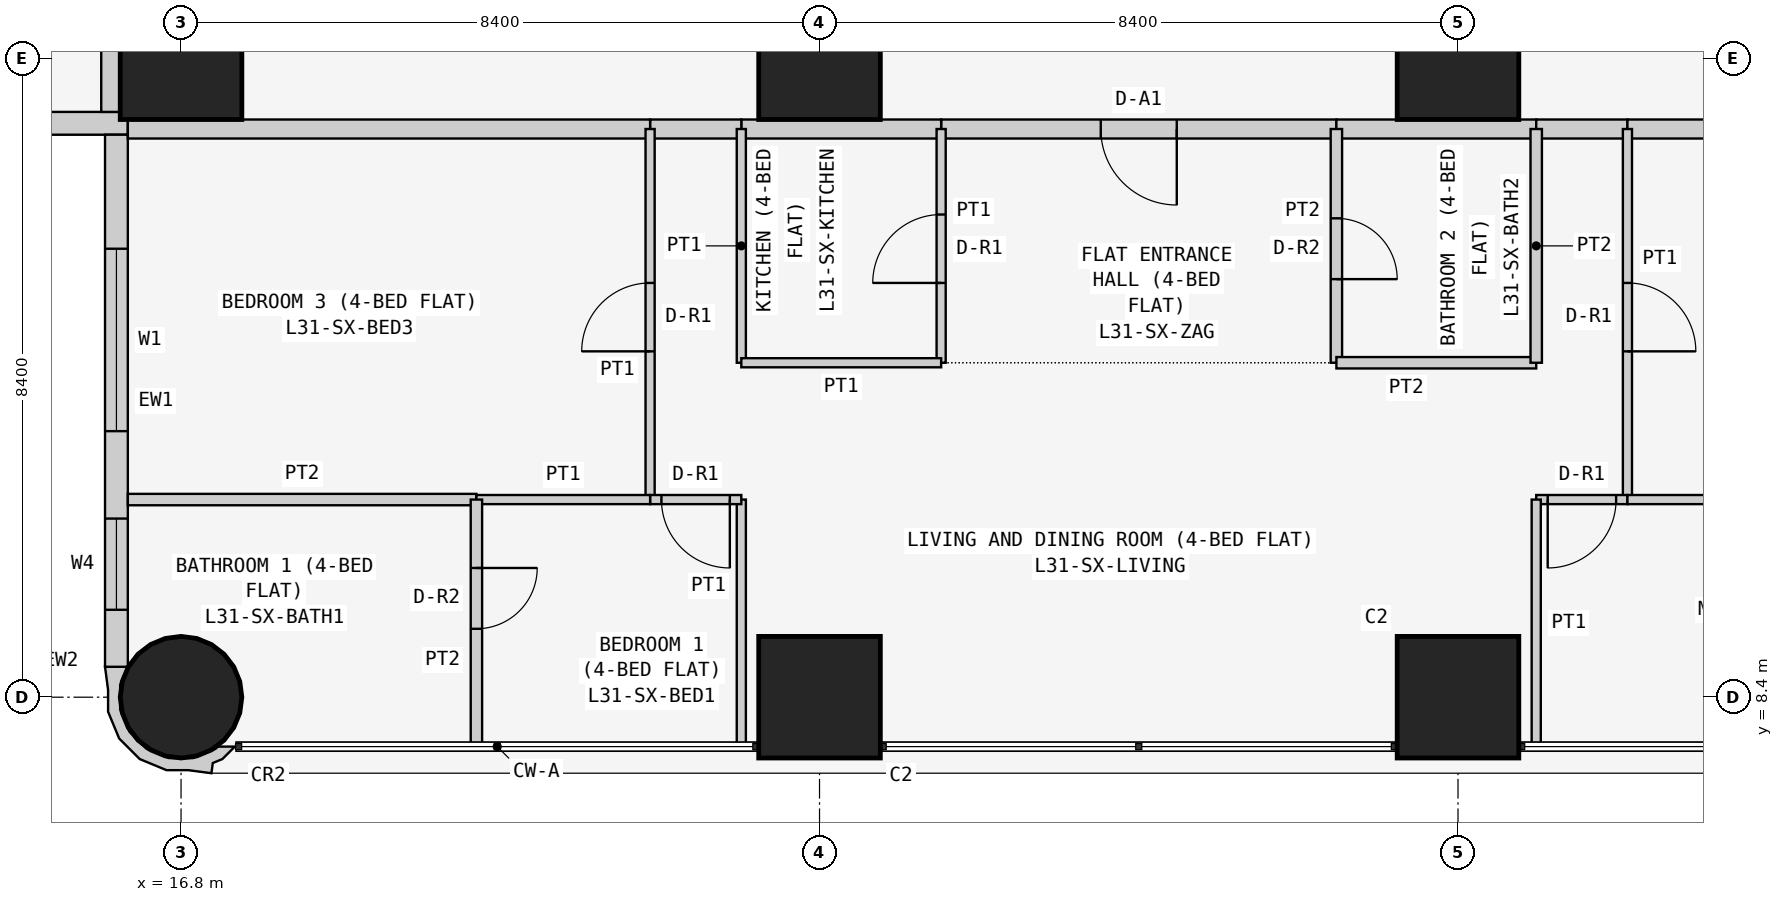
"""IFC4 building model, lengths in metres.
Left out: names, types, materials, properties, quantities, classifications, styles, units other than length and angle.
Written with IfcOpenShell. Run it as: python <this file> out.ifc"""

import sys

from ifc_helpers import new_model, si_unit, direction, frame, frame_2d, origin, origin_2d, place, context, subcontext, project, spatial, polyline, rectangle, circle, outline, extrude, element, fill, save


model = new_model("IFC4")
c1 = context("Model", 3, precision=1e-05, world=origin(), true_north=direction((0.0, 1.0)))
c2 = subcontext(c1, "Body", "Model", "MODEL_VIEW")
j1 = project(units=[si_unit("LENGTHUNIT", "METRE"), si_unit("PLANEANGLEUNIT", "RADIAN")], contexts=[c1])
p1 = place(None, origin())
s1 = spatial("IfcSite", under=j1, at=p1, CompositionType="ELEMENT")
p2 = place(p1, origin())
s2 = spatial("IfcBuilding", under=s1, at=p2, CompositionType="ELEMENT")
p3 = place(p2, frame((0.0, 0.0, 123.3)))
s3 = spatial("IfcBuildingStorey", under=s2, at=p3, CompositionType="ELEMENT", Elevation=123.3)
p4 = place(p3, frame((16.8, 8.4, 0.0), z_axis=(0.0, 0.0, 1.0), x_axis=(1.0, 0.0, 0.0)))
e1 = element("IfcColumn", 1, at=p4, inside=s3, PredefinedType="COLUMN", context=c2, shape_type="SweptSolid", body=[
    extrude(circle(Radius=0.8, at=origin_2d()), origin(), (0.0, 0.0, 1.0), 3.6),
])
for number, where, z_axis, x_axis in (
    (2, (16.8, 16.8, 0.0), (0.0, 0.0, 1.0), (1.0, 0.0, 0.0)),
    (3, (25.2, 8.4, 0.0), (0.0, 0.0, 1.0), (1.0, 0.0, 0.0)),
    (4, (25.2, 16.8, 0.0), (0.0, 0.0, 1.0), (1.0, 0.0, 0.0)),
    (5, (33.6, 8.4, 0.0), (0.0, 0.0, 1.0), (1.0, 0.0, 0.0)),
    (6, (33.6, 16.8, 0.0), (0.0, 0.0, 1.0), (1.0, 0.0, 0.0)),
):
    element("IfcColumn", number, at=place(p3, frame(where, z_axis=z_axis, x_axis=x_axis)), inside=s3, PredefinedType="COLUMN", context=c2, shape_type="SweptSolid", body=[
        extrude(rectangle(XDim=1.6, YDim=1.6, at=origin_2d()), origin(), (0.0, 0.0, 1.0), 3.6),
    ])
p5 = place(p3, frame((0.4, 15.95, 0.0), z_axis=(0.0, 0.0, 1.0), x_axis=(1.0, 0.0, 0.0)))
e7 = element("IfcWall", 7, at=p5, inside=s3, PredefinedType="SOLIDWALL", context=c2, shape_type="SweptSolid", body=[
    extrude(rectangle(XDim=15.7, YDim=0.3, at=frame_2d((7.85, 0.0))), origin(), (0.0, 0.0, 1.0), 3.45),
])
p6 = place(p5, frame((12.4, 0.0, 0.9)))
e8 = element("IfcOpeningElement", 8, at=p6, cuts=e7, PredefinedType="OPENING", context=c2, shape_type="SweptSolid", body=[
    extrude(rectangle(XDim=1.8, YDim=1.5, at=frame_2d((0.9, 0.75))), frame((0.0, 0.16, 0.0), z_axis=(0.0, -1.0, 0.0), x_axis=(1.0, 0.0, 0.0)), (0.0, 0.0, 1.0), 0.32),
])
p7 = place(p5, frame((9.55, 0.0, 1.5)))
e9 = element("IfcOpeningElement", 9, at=p7, cuts=e7, PredefinedType="OPENING", context=c2, shape_type="SweptSolid", body=[
    extrude(rectangle(XDim=0.9, YDim=0.7, at=frame_2d((0.45, 0.35))), frame((0.0, 0.16, 0.0), z_axis=(0.0, -1.0, 0.0), x_axis=(1.0, 0.0, 0.0)), (0.0, 0.0, 1.0), 0.32),
])
p8 = place(p5, frame((5.1, 0.0, 0.9)))
e10 = element("IfcOpeningElement", 10, at=p8, cuts=e7, PredefinedType="OPENING", context=c2, shape_type="SweptSolid", body=[
    extrude(rectangle(XDim=1.8, YDim=1.5, at=frame_2d((0.9, 0.75))), frame((0.0, 0.16, 0.0), z_axis=(0.0, -1.0, 0.0), x_axis=(1.0, 0.0, 0.0)), (0.0, 0.0, 1.0), 0.32),
])
p9 = place(p5, frame((2.0, 0.0, 0.0)))
e11 = element("IfcOpeningElement", 11, at=p9, cuts=e7, PredefinedType="OPENING", context=c2, shape_type="SweptSolid", body=[
    extrude(rectangle(XDim=0.9, YDim=2.4, at=frame_2d((0.45, 1.2))), frame((0.0, 0.16, 0.0), z_axis=(0.0, -1.0, 0.0), x_axis=(1.0, 0.0, 0.0)), (0.0, 0.0, 1.0), 0.32),
])
p10 = place(p5, frame((0.7, 0.0, 0.9)))
e12 = element("IfcOpeningElement", 12, at=p10, cuts=e7, PredefinedType="OPENING", context=c2, shape_type="SweptSolid", body=[
    extrude(rectangle(XDim=1.2, YDim=1.5, at=frame_2d((0.6, 0.75))), frame((0.0, 0.16, 0.0), z_axis=(0.0, -1.0, 0.0), x_axis=(1.0, 0.0, 0.0)), (0.0, 0.0, 1.0), 0.32),
])
p11 = place(p3, frame((15.95, 15.8, 0.0), z_axis=(0.0, 0.0, 1.0), x_axis=(0.0, -1.0, 0.0)))
e13 = element("IfcWall", 13, at=p11, inside=s3, PredefinedType="SOLIDWALL", context=c2, shape_type="SweptSolid", body=[
    extrude(rectangle(XDim=7.0, YDim=0.3, at=frame_2d((3.5, 0.0))), origin(), (0.0, 0.0, 1.0), 3.45),
])
p12 = place(p11, frame((1.5, 0.0, 0.9)))
e14 = element("IfcOpeningElement", 14, at=p12, cuts=e13, PredefinedType="OPENING", context=c2, shape_type="SweptSolid", body=[
    extrude(rectangle(XDim=2.4, YDim=1.5, at=frame_2d((1.2, 0.75))), frame((0.0, 0.16, 0.0), z_axis=(0.0, -1.0, 0.0), x_axis=(1.0, 0.0, 0.0)), (0.0, 0.0, 1.0), 0.32),
])
p13 = place(p11, frame((5.05, 0.0, 0.9)))
e15 = element("IfcOpeningElement", 15, at=p13, cuts=e13, PredefinedType="OPENING", context=c2, shape_type="SweptSolid", body=[
    extrude(rectangle(XDim=1.2, YDim=1.5, at=frame_2d((0.6, 0.75))), frame((0.0, 0.16, 0.0), z_axis=(0.0, -1.0, 0.0), x_axis=(1.0, 0.0, 0.0)), (0.0, 0.0, 1.0), 0.32),
])
p14 = place(p3, frame((15.983, 8.727, 0.0), z_axis=(0.0, 0.0, 1.0), x_axis=(-0.343276641956, -0.93923434088, 0.0)))
e16 = element("IfcWall", 16, at=p14, inside=s3, PredefinedType="SOLIDWALL", context=c2, shape_type="SweptSolid", body=[
    extrude(outline(polyline([(0.829, 1.599), (0.697, 1.569), (0.604, 1.67), (0.394, 1.767), (0.471, 1.556), (0.509, 1.539), (0.724, 1.304), (0.833, 1.005), (0.82, 0.686), (0.686, 0.397), (0.451, 0.182), (0.152, 0.073), (-0.116, 0.084), (-0.127, 0.078), (-0.146, 0.071), (-0.006, -0.197), (0.266, -0.055), (0.535, 0.044), (0.817, 0.302), (0.978, 0.648), (0.994, 1.03), (0.895, 1.3), (0.829, 1.599)])), origin(), (0.0, 0.0, 1.0), 3.45),
])
p15 = place(p3, frame((32.0, 15.875, 0.0), z_axis=(0.0, 0.0, 1.0), x_axis=(-1.0, 0.0, 0.0)))
e17 = element("IfcWall", 17, at=p15, inside=s3, PredefinedType="PARTITIONING", context=c2, shape_type="SweptSolid", body=[
    extrude(rectangle(XDim=5.2, YDim=0.25, at=frame_2d((2.6, 0.0))), origin(), (0.0, 0.0, 1.0), 3.45),
])
p16 = place(p15, frame((2.1, 0.0, 0.0)))
e18 = element("IfcOpeningElement", 18, at=p16, cuts=e17, PredefinedType="OPENING", context=c2, shape_type="SweptSolid", body=[
    extrude(rectangle(XDim=1.0, YDim=2.1, at=frame_2d((0.5, 1.05))), frame((0.0, 0.135, 0.0), z_axis=(0.0, -1.0, 0.0), x_axis=(1.0, 0.0, 0.0)), (0.0, 0.0, 1.0), 0.27),
])
p17 = place(p3, frame((34.629, 15.875, 0.0), z_axis=(0.0, 0.0, 1.0), x_axis=(-1.0, 0.0, 0.0)))
e19 = element("IfcWall", 19, at=p17, inside=s3, PredefinedType="PARTITIONING", context=c2, shape_type="SweptSolid", body=[
    extrude(rectangle(XDim=2.629, YDim=0.25, at=frame_2d((1.314, 0.0))), origin(), (0.0, 0.0, 1.0), 3.45),
])
p18 = place(p3, frame((26.8, 15.875, 0.0), z_axis=(0.0, 0.0, 1.0), x_axis=(-1.0, 0.0, 0.0)))
e20 = element("IfcWall", 20, at=p18, inside=s3, PredefinedType="PARTITIONING", context=c2, shape_type="SweptSolid", body=[
    extrude(rectangle(XDim=2.629, YDim=0.25, at=frame_2d((1.314, 0.0))), origin(), (0.0, 0.0, 1.0), 3.45),
])
p19 = place(p3, frame((24.171, 15.875, 0.0), z_axis=(0.0, 0.0, 1.0), x_axis=(-1.0, 0.0, 0.0)))
e21 = element("IfcWall", 21, at=p19, inside=s3, PredefinedType="PARTITIONING", context=c2, shape_type="SweptSolid", body=[
    extrude(rectangle(XDim=1.2, YDim=0.25, at=frame_2d((0.6, 0.0))), origin(), (0.0, 0.0, 1.0), 3.45),
])
p20 = place(p3, frame((35.829, 15.875, 0.0), z_axis=(0.0, 0.0, 1.0), x_axis=(-1.0, 0.0, 0.0)))
e22 = element("IfcWall", 22, at=p20, inside=s3, PredefinedType="PARTITIONING", context=c2, shape_type="SweptSolid", body=[
    extrude(rectangle(XDim=1.2, YDim=0.25, at=frame_2d((0.6, 0.0))), origin(), (0.0, 0.0, 1.0), 3.45),
])
for number, where, z_axis, x_axis in (
    (23, (42.7, 15.875, 0.0), (0.0, 0.0, 1.0), (-1.0, 0.0, 0.0)),
    (24, (22.971, 15.875, 0.0), (0.0, 0.0, 1.0), (-1.0, 0.0, 0.0)),
    (25, (15.875, 16.1, 0.0), (0.0, 0.0, 1.0), (0.0, 1.0, 0.0)),
):
    element("IfcWall", number, at=place(p3, frame(where, z_axis=z_axis, x_axis=x_axis)), inside=s3, PredefinedType="PARTITIONING", context=c2, shape_type="SweptSolid", body=[
        extrude(rectangle(XDim=6.871, YDim=0.25, at=frame_2d((3.436, 0.0))), origin(), (0.0, 0.0, 1.0), 3.45),
    ])
p21 = place(p3, frame((32.0, 12.8, 0.0), z_axis=(0.0, 0.0, 1.0), x_axis=(0.0, 1.0, 0.0)))
e26 = element("IfcWall", 26, at=p21, inside=s3, PredefinedType="PARTITIONING", context=c2, shape_type="SweptSolid", body=[
    extrude(rectangle(XDim=3.075, YDim=0.15, at=frame_2d((1.538, 0.0))), origin(), (0.0, 0.0, 1.0), 3.45),
])
p22 = place(p21, frame((1.1, 0.0, 0.0)))
e27 = element("IfcOpeningElement", 27, at=p22, cuts=e26, PredefinedType="OPENING", context=c2, shape_type="SweptSolid", body=[
    extrude(rectangle(XDim=0.8, YDim=2.1, at=frame_2d((0.4, 1.05))), frame((0.0, 0.085, 0.0), z_axis=(0.0, -1.0, 0.0), x_axis=(1.0, 0.0, 0.0)), (0.0, 0.0, 1.0), 0.17),
])
p23 = place(p3, frame((26.8, 15.875, 0.0), z_axis=(0.0, 0.0, 1.0), x_axis=(0.0, -1.0, 0.0)))
e28 = element("IfcWall", 28, at=p23, inside=s3, PredefinedType="PARTITIONING", context=c2, shape_type="SweptSolid", body=[
    extrude(rectangle(XDim=3.075, YDim=0.12, at=frame_2d((1.538, 0.0))), origin(), (0.0, 0.0, 1.0), 3.45),
])
p24 = place(p23, frame((1.125, 0.0, 0.0)))
e29 = element("IfcOpeningElement", 29, at=p24, cuts=e28, PredefinedType="OPENING", context=c2, shape_type="SweptSolid", body=[
    extrude(rectangle(XDim=0.9, YDim=2.1, at=frame_2d((0.45, 1.05))), frame((0.0, 0.07, 0.0), z_axis=(0.0, -1.0, 0.0), x_axis=(1.0, 0.0, 0.0)), (0.0, 0.0, 1.0), 0.14),
])
p25 = place(p3, frame((32.0, 12.8, 0.0), z_axis=(0.0, 0.0, 1.0), x_axis=(1.0, 0.0, 0.0)))
e30 = element("IfcWall", 30, at=p25, inside=s3, PredefinedType="PARTITIONING", context=c2, shape_type="SweptSolid", body=[
    extrude(rectangle(XDim=2.629, YDim=0.15, at=frame_2d((1.314, 0.0))), origin(), (0.0, 0.0, 1.0), 3.45),
])
p26 = place(p3, frame((34.629, 12.8, 0.0), z_axis=(0.0, 0.0, 1.0), x_axis=(0.0, 1.0, 0.0)))
e31 = element("IfcWall", 31, at=p26, inside=s3, PredefinedType="PARTITIONING", context=c2, shape_type="SweptSolid", body=[
    extrude(rectangle(XDim=3.075, YDim=0.15, at=frame_2d((1.538, 0.0))), origin(), (0.0, 0.0, 1.0), 3.45),
])
p27 = place(p3, frame((24.171, 15.875, 0.0), z_axis=(0.0, 0.0, 1.0), x_axis=(0.0, -1.0, 0.0)))
e32 = element("IfcWall", 32, at=p27, inside=s3, PredefinedType="PARTITIONING", context=c2, shape_type="SweptSolid", body=[
    extrude(rectangle(XDim=3.075, YDim=0.12, at=frame_2d((1.538, 0.0))), origin(), (0.0, 0.0, 1.0), 3.45),
])
p28 = place(p3, frame((24.171, 12.8, 0.0), z_axis=(0.0, 0.0, 1.0), x_axis=(1.0, 0.0, 0.0)))
e33 = element("IfcWall", 33, at=p28, inside=s3, PredefinedType="PARTITIONING", context=c2, shape_type="SweptSolid", body=[
    extrude(rectangle(XDim=2.629, YDim=0.12, at=frame_2d((1.314, 0.0))), origin(), (0.0, 0.0, 1.0), 3.45),
])
p29 = place(p3, frame((35.829, 15.875, 0.0), z_axis=(0.0, 0.0, 1.0), x_axis=(0.0, -1.0, 0.0)))
e34 = element("IfcWall", 34, at=p29, inside=s3, PredefinedType="PARTITIONING", context=c2, shape_type="SweptSolid", body=[
    extrude(rectangle(XDim=4.875, YDim=0.12, at=frame_2d((2.438, 0.0))), origin(), (0.0, 0.0, 1.0), 3.45),
])
p30 = place(p29, frame((2.025, 0.0, 0.0)))
e35 = element("IfcOpeningElement", 35, at=p30, cuts=e34, PredefinedType="OPENING", context=c2, shape_type="SweptSolid", body=[
    extrude(rectangle(XDim=0.9, YDim=2.1, at=frame_2d((0.45, 1.05))), frame((0.0, 0.07, 0.0), z_axis=(0.0, -1.0, 0.0), x_axis=(1.0, 0.0, 0.0)), (0.0, 0.0, 1.0), 0.14),
])
p31 = place(p3, frame((35.829, 11.0, 0.0), z_axis=(0.0, 0.0, 1.0), x_axis=(-1.0, 0.0, 0.0)))
e36 = element("IfcWall", 36, at=p31, inside=s3, PredefinedType="PARTITIONING", context=c2, shape_type="SweptSolid", body=[
    extrude(rectangle(XDim=1.2, YDim=0.12, at=frame_2d((0.6, 0.0))), origin(), (0.0, 0.0, 1.0), 3.45),
])
p32 = place(p31, frame((0.149, 0.0, 0.0)))
e37 = element("IfcOpeningElement", 37, at=p32, cuts=e36, PredefinedType="OPENING", context=c2, shape_type="SweptSolid", body=[
    extrude(rectangle(XDim=0.9, YDim=2.1, at=frame_2d((0.45, 1.05))), frame((0.0, 0.07, 0.0), z_axis=(0.0, -1.0, 0.0), x_axis=(1.0, 0.0, 0.0)), (0.0, 0.0, 1.0), 0.14),
])
p33 = place(p3, frame((34.629, 11.0, 0.0), z_axis=(0.0, 0.0, 1.0), x_axis=(0.0, -1.0, 0.0)))
e38 = element("IfcWall", 38, at=p33, inside=s3, PredefinedType="PARTITIONING", context=c2, shape_type="SweptSolid", body=[
    extrude(rectangle(XDim=3.25, YDim=0.12, at=frame_2d((1.625, 0.0))), origin(), (0.0, 0.0, 1.0), 3.45),
])
p34 = place(p3, frame((22.971, 11.0, 0.0), z_axis=(0.0, 0.0, 1.0), x_axis=(0.0, 1.0, 0.0)))
e39 = element("IfcWall", 39, at=p34, inside=s3, PredefinedType="PARTITIONING", context=c2, shape_type="SweptSolid", body=[
    extrude(rectangle(XDim=4.875, YDim=0.12, at=frame_2d((2.438, 0.0))), origin(), (0.0, 0.0, 1.0), 3.45),
])
p35 = place(p34, frame((1.95, 0.0, 0.0)))
e40 = element("IfcOpeningElement", 40, at=p35, cuts=e39, PredefinedType="OPENING", context=c2, shape_type="SweptSolid", body=[
    extrude(rectangle(XDim=0.9, YDim=2.1, at=frame_2d((0.45, 1.05))), frame((0.0, 0.07, 0.0), z_axis=(0.0, -1.0, 0.0), x_axis=(1.0, 0.0, 0.0)), (0.0, 0.0, 1.0), 0.14),
])
p36 = place(p3, frame((24.171, 7.75, 0.0), z_axis=(0.0, 0.0, 1.0), x_axis=(0.0, 1.0, 0.0)))
e41 = element("IfcWall", 41, at=p36, inside=s3, PredefinedType="PARTITIONING", context=c2, shape_type="SweptSolid", body=[
    extrude(rectangle(XDim=3.25, YDim=0.12, at=frame_2d((1.625, 0.0))), origin(), (0.0, 0.0, 1.0), 3.45),
])
p37 = place(p3, frame((24.171, 11.0, 0.0), z_axis=(0.0, 0.0, 1.0), x_axis=(-1.0, 0.0, 0.0)))
e42 = element("IfcWall", 42, at=p37, inside=s3, PredefinedType="PARTITIONING", context=c2, shape_type="SweptSolid", body=[
    extrude(rectangle(XDim=1.2, YDim=0.12, at=frame_2d((0.6, 0.0))), origin(), (0.0, 0.0, 1.0), 3.45),
])
p38 = place(p37, frame((0.151, 0.0, 0.0)))
e43 = element("IfcOpeningElement", 43, at=p38, cuts=e42, PredefinedType="OPENING", context=c2, shape_type="SweptSolid", body=[
    extrude(rectangle(XDim=0.9, YDim=2.1, at=frame_2d((0.45, 1.05))), frame((0.0, 0.07, 0.0), z_axis=(0.0, -1.0, 0.0), x_axis=(1.0, 0.0, 0.0)), (0.0, 0.0, 1.0), 0.14),
])
p39 = place(p3, frame((35.829, 11.0, 0.0), z_axis=(0.0, 0.0, 1.0), x_axis=(1.0, 0.0, 0.0)))
e44 = element("IfcWall", 44, at=p39, inside=s3, PredefinedType="PARTITIONING", context=c2, shape_type="SweptSolid", body=[
    extrude(rectangle(XDim=6.871, YDim=0.12, at=frame_2d((3.436, 0.0))), origin(), (0.0, 0.0, 1.0), 3.45),
])
p40 = place(p3, frame((16.1, 11.0, 0.0), z_axis=(0.0, 0.0, 1.0), x_axis=(1.0, 0.0, 0.0)))
e45 = element("IfcWall", 45, at=p40, inside=s3, PredefinedType="PARTITIONING", context=c2, shape_type="SweptSolid", body=[
    extrude(rectangle(XDim=4.586, YDim=0.15, at=frame_2d((2.293, 0.0))), origin(), (0.0, 0.0, 1.0), 3.45),
])
p41 = place(p3, frame((20.686, 11.0, 0.0), z_axis=(0.0, 0.0, 1.0), x_axis=(1.0, 0.0, 0.0)))
e46 = element("IfcWall", 46, at=p41, inside=s3, PredefinedType="PARTITIONING", context=c2, shape_type="SweptSolid", body=[
    extrude(rectangle(XDim=2.285, YDim=0.12, at=frame_2d((1.143, 0.0))), origin(), (0.0, 0.0, 1.0), 3.45),
])
p42 = place(p3, frame((20.686, 7.75, 0.0), z_axis=(0.0, 0.0, 1.0), x_axis=(0.0, 1.0, 0.0)))
e47 = element("IfcWall", 47, at=p42, inside=s3, PredefinedType="PARTITIONING", context=c2, shape_type="SweptSolid", body=[
    extrude(rectangle(XDim=3.25, YDim=0.15, at=frame_2d((1.625, 0.0))), origin(), (0.0, 0.0, 1.0), 3.45),
])
p43 = place(p42, frame((1.55, 0.0, 0.0)))
e48 = element("IfcOpeningElement", 48, at=p43, cuts=e47, PredefinedType="OPENING", context=c2, shape_type="SweptSolid", body=[
    extrude(rectangle(XDim=0.8, YDim=2.1, at=frame_2d((0.4, 1.05))), frame((0.0, 0.085, 0.0), z_axis=(0.0, -1.0, 0.0), x_axis=(1.0, 0.0, 0.0)), (0.0, 0.0, 1.0), 0.17),
])
p44 = place(p12, origin())
e49 = element("IfcWindow", 49, at=p44, inside=s3, PartitioningType="SINGLE_PANEL", PredefinedType="WINDOW", context=c2, shape_type="SweptSolid", body=[
    extrude(rectangle(XDim=2.4, YDim=1.5, at=frame_2d((1.2, 0.75))), frame((0.0, 0.03, 0.0), z_axis=(0.0, -1.0, 0.0), x_axis=(1.0, 0.0, 0.0)), (0.0, 0.0, 1.0), 0.06),
])
fill(e14, e49)
p45 = place(p13, origin())
e50 = element("IfcWindow", 50, at=p45, inside=s3, PartitioningType="SINGLE_PANEL", PredefinedType="WINDOW", context=c2, shape_type="SweptSolid", body=[
    extrude(rectangle(XDim=1.2, YDim=1.5, at=frame_2d((0.6, 0.75))), frame((0.0, 0.03, 0.0), z_axis=(0.0, -1.0, 0.0), x_axis=(1.0, 0.0, 0.0)), (0.0, 0.0, 1.0), 0.06),
])
fill(e15, e50)
p46 = place(p16, origin())
e51 = element("IfcDoor", 51, at=p46, inside=s3, OperationType="SINGLE_SWING_LEFT", PredefinedType="DOOR", context=c2, shape_type="SweptSolid", body=[
    extrude(rectangle(XDim=1.0, YDim=2.1, at=frame_2d((0.5, 1.05))), frame((0.0, 0.025, 0.0), z_axis=(0.0, -1.0, 0.0), x_axis=(1.0, 0.0, 0.0)), (0.0, 0.0, 1.0), 0.05),
])
fill(e18, e51)
p47 = place(p22, frame((0.8, 0.0, 0.0), z_axis=(0.0, 0.0, 1.0), x_axis=(-1.0, 0.0, 0.0)))
e52 = element("IfcDoor", 52, at=p47, inside=s3, OperationType="SINGLE_SWING_RIGHT", PredefinedType="DOOR", context=c2, shape_type="SweptSolid", body=[
    extrude(rectangle(XDim=0.8, YDim=2.1, at=frame_2d((0.4, 1.05))), frame((0.0, 0.025, 0.0), z_axis=(0.0, -1.0, 0.0), x_axis=(1.0, 0.0, 0.0)), (0.0, 0.0, 1.0), 0.05),
])
fill(e27, e52)
p48 = place(p24, frame((0.9, 0.0, 0.0), z_axis=(0.0, 0.0, 1.0), x_axis=(-1.0, 0.0, 0.0)))
e53 = element("IfcDoor", 53, at=p48, inside=s3, OperationType="SINGLE_SWING_LEFT", PredefinedType="DOOR", context=c2, shape_type="SweptSolid", body=[
    extrude(rectangle(XDim=0.9, YDim=2.1, at=frame_2d((0.45, 1.05))), frame((0.0, 0.025, 0.0), z_axis=(0.0, -1.0, 0.0), x_axis=(1.0, 0.0, 0.0)), (0.0, 0.0, 1.0), 0.05),
])
fill(e29, e53)
p49 = place(p30, origin())
e54 = element("IfcDoor", 54, at=p49, inside=s3, OperationType="SINGLE_SWING_RIGHT", PredefinedType="DOOR", context=c2, shape_type="SweptSolid", body=[
    extrude(rectangle(XDim=0.9, YDim=2.1, at=frame_2d((0.45, 1.05))), frame((0.0, 0.025, 0.0), z_axis=(0.0, -1.0, 0.0), x_axis=(1.0, 0.0, 0.0)), (0.0, 0.0, 1.0), 0.05),
])
fill(e35, e54)
p50 = place(p32, origin())
e55 = element("IfcDoor", 55, at=p50, inside=s3, OperationType="SINGLE_SWING_RIGHT", PredefinedType="DOOR", context=c2, shape_type="SweptSolid", body=[
    extrude(rectangle(XDim=0.9, YDim=2.1, at=frame_2d((0.45, 1.05))), frame((0.0, 0.025, 0.0), z_axis=(0.0, -1.0, 0.0), x_axis=(1.0, 0.0, 0.0)), (0.0, 0.0, 1.0), 0.05),
])
fill(e37, e55)
p51 = place(p35, origin())
e56 = element("IfcDoor", 56, at=p51, inside=s3, OperationType="SINGLE_SWING_LEFT", PredefinedType="DOOR", context=c2, shape_type="SweptSolid", body=[
    extrude(rectangle(XDim=0.9, YDim=2.1, at=frame_2d((0.45, 1.05))), frame((0.0, 0.025, 0.0), z_axis=(0.0, -1.0, 0.0), x_axis=(1.0, 0.0, 0.0)), (0.0, 0.0, 1.0), 0.05),
])
fill(e40, e56)
p52 = place(p38, origin())
e57 = element("IfcDoor", 57, at=p52, inside=s3, OperationType="SINGLE_SWING_LEFT", PredefinedType="DOOR", context=c2, shape_type="SweptSolid", body=[
    extrude(rectangle(XDim=0.9, YDim=2.1, at=frame_2d((0.45, 1.05))), frame((0.0, 0.025, 0.0), z_axis=(0.0, -1.0, 0.0), x_axis=(1.0, 0.0, 0.0)), (0.0, 0.0, 1.0), 0.05),
])
fill(e43, e57)
p53 = place(p43, frame((0.8, 0.0, 0.0), z_axis=(0.0, 0.0, 1.0), x_axis=(-1.0, 0.0, 0.0)))
e58 = element("IfcDoor", 58, at=p53, inside=s3, OperationType="SINGLE_SWING_LEFT", PredefinedType="DOOR", context=c2, shape_type="SweptSolid", body=[
    extrude(rectangle(XDim=0.8, YDim=2.1, at=frame_2d((0.4, 1.05))), frame((0.0, 0.025, 0.0), z_axis=(0.0, -1.0, 0.0), x_axis=(1.0, 0.0, 0.0)), (0.0, 0.0, 1.0), 0.05),
])
fill(e48, e58)
save(model, sys.argv[1])
